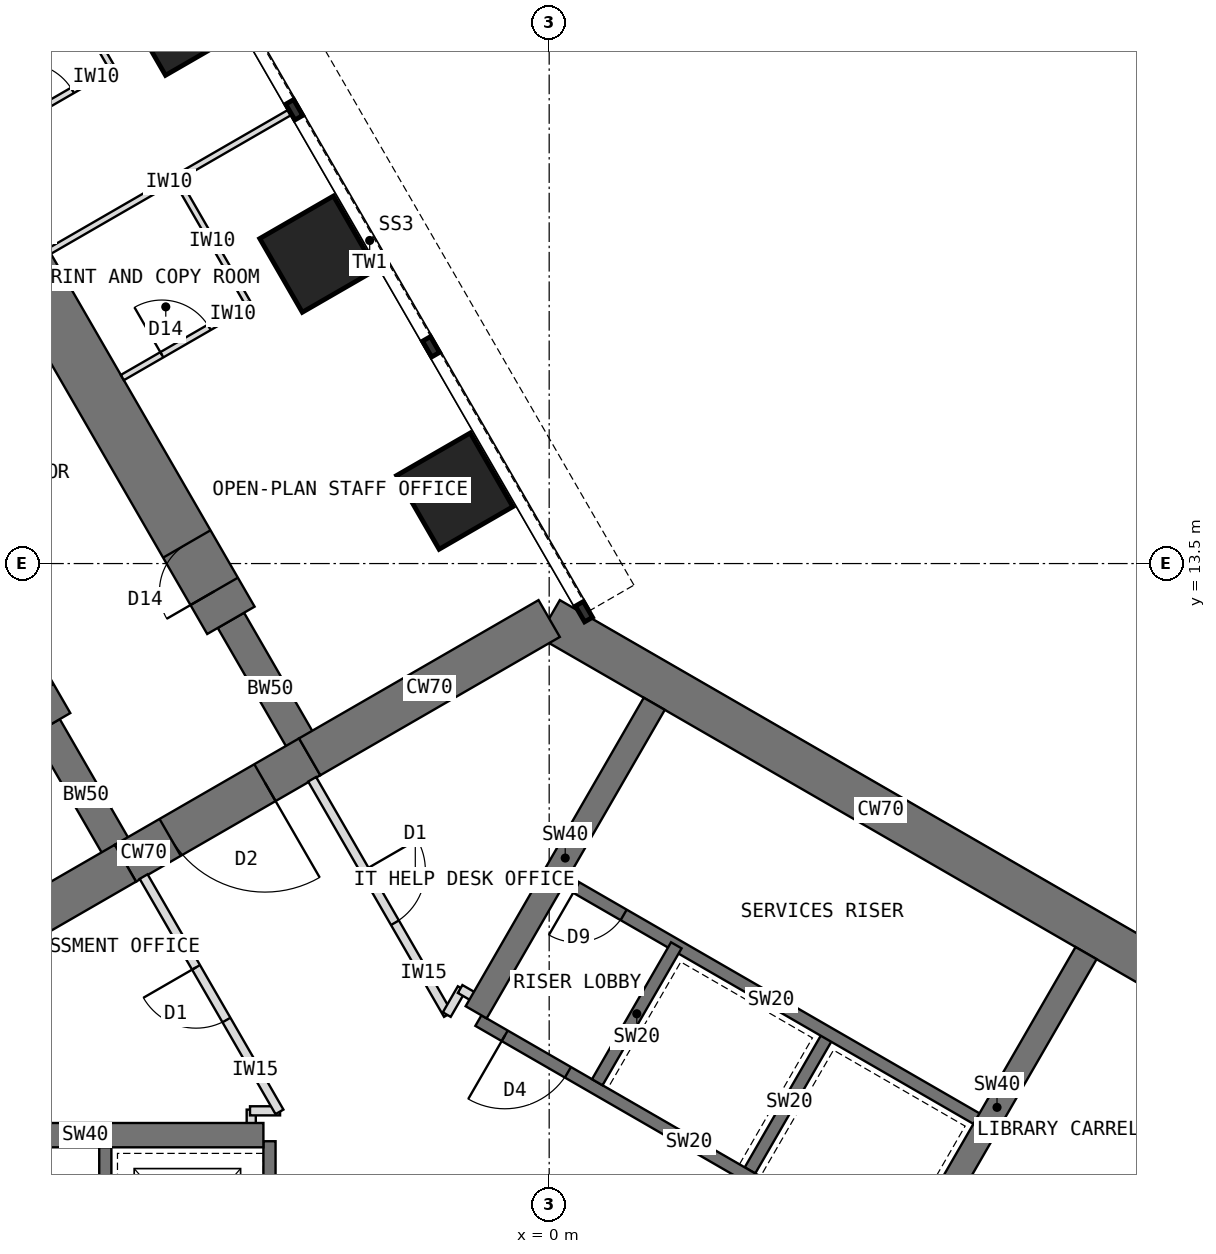
"""IFC4 building model, lengths in metres.
Left out: names, types, materials, properties, quantities, classifications, styles, units other than length and angle.
Written with IfcOpenShell. Run it as: python <this file> out.ifc"""

import sys

from ifc_helpers import new_model, si_unit, direction, frame, frame_2d, origin, origin_2d, place, context, subcontext, project, spatial, rectangle, extrude, element, fill, save


model = new_model("IFC4")
c1 = context("Model", 3, precision=1e-05, world=origin(), true_north=direction((0.0, 1.0)))
c2 = subcontext(c1, "Body", "Model", "MODEL_VIEW")
j1 = project(units=[si_unit("LENGTHUNIT", "METRE"), si_unit("PLANEANGLEUNIT", "RADIAN")], contexts=[c1])
p1 = place(None, origin())
s1 = spatial("IfcSite", under=j1, at=p1, CompositionType="ELEMENT")
p2 = place(p1, origin())
s2 = spatial("IfcBuilding", under=s1, at=p2, CompositionType="ELEMENT")
p3 = place(p2, frame((0.0, 0.0, 80.5)))
s3 = spatial("IfcBuildingStorey", under=s2, at=p3, CompositionType="ELEMENT", Elevation=80.5)
p4 = place(p3, frame((10.908, 6.298, 0.0), z_axis=(0.0, 0.0, 1.0), x_axis=(-0.866021940709, 0.500005998175, 0.0)))
e1 = element("IfcWall", 1, at=p4, inside=s3, PredefinedType="SHEAR", context=c2, shape_type="SweptSolid", body=[
    extrude(rectangle(XDim=12.596, YDim=0.7, at=frame_2d((6.298, 0.0))), origin(), (0.0, 0.0, 1.0), 4.0),
])
p5 = place(p3, frame((0.0, 12.596, 0.0), z_axis=(0.0, 0.0, 1.0), x_axis=(-0.866011268655, -0.500024481964, 0.0)))
e2 = element("IfcWall", 2, at=p5, inside=s3, PredefinedType="SHEAR", context=c2, shape_type="SweptSolid", body=[
    extrude(rectangle(XDim=4.548, YDim=0.7, at=frame_2d((2.274, 0.0))), origin(), (0.0, 0.0, 1.0), 4.0),
])
p6 = place(p3, frame((-3.939, 10.322, 0.0), z_axis=(0.0, 0.0, 1.0), x_axis=(-0.866019471182, -0.500010275428, 0.0)))
e3 = element("IfcWall", 3, at=p6, inside=s3, PredefinedType="SHEAR", context=c2, shape_type="SweptSolid", body=[
    extrude(rectangle(XDim=3.5, YDim=0.7, at=frame_2d((1.75, 0.0))), origin(), (0.0, 0.0, 1.0), 4.0),
])
p7 = place(p6, frame((0.85, 0.0, 0.0)))
e4 = element("IfcOpeningElement", 4, at=p7, cuts=e3, PredefinedType="OPENING", context=c2, shape_type="SweptSolid", body=[
    extrude(rectangle(XDim=1.8, YDim=2.1, at=frame_2d((0.9, 1.05))), frame((0.0, 0.36, 0.0), z_axis=(0.0, -1.0, 0.0), x_axis=(1.0, 0.0, 0.0)), (0.0, 0.0, 1.0), 0.72),
])
p8 = place(p3, frame((-6.97, 8.572, 0.0), z_axis=(0.0, 0.0, 1.0), x_axis=(-0.866034513004, -0.499984222037, 0.0)))
e5 = element("IfcWall", 5, at=p8, inside=s3, PredefinedType="SHEAR", context=c2, shape_type="SweptSolid", body=[
    extrude(rectangle(XDim=4.548, YDim=0.7, at=frame_2d((2.274, 0.0))), origin(), (0.0, 0.0, 1.0), 4.0),
])
p9 = place(p3, frame((-6.97, 8.572, 0.0), z_axis=(0.0, 0.0, 1.0), x_axis=(-0.499988811324, 0.866031863473, 0.0)))
e6 = element("IfcWall", 6, at=p9, inside=s3, PredefinedType="SHEAR", context=c2, shape_type="SweptSolid", body=[
    extrude(rectangle(XDim=2.592, YDim=0.5, at=frame_2d((1.296, 0.0))), origin(), (0.0, 0.0, 1.0), 4.0),
])
p10 = place(p3, frame((-8.266, 10.816, 0.0), z_axis=(0.0, 0.0, 1.0), x_axis=(-0.499996231654, 0.866027579429, 0.0)))
e7 = element("IfcWall", 7, at=p10, inside=s3, PredefinedType="SHEAR", context=c2, shape_type="SweptSolid", body=[
    extrude(rectangle(XDim=13.2, YDim=0.9, at=frame_2d((6.6, 0.0))), origin(), (0.0, 0.0, 1.0), 4.0),
])
p11 = place(p10, frame((0.55, 0.0, 0.0)))
e8 = element("IfcOpeningElement", 8, at=p11, cuts=e7, PredefinedType="OPENING", context=c2, shape_type="SweptSolid", body=[
    extrude(rectangle(XDim=0.9, YDim=2.1, at=frame_2d((0.45, 1.05))), frame((0.0, 0.46, 0.0), z_axis=(0.0, -1.0, 0.0), x_axis=(1.0, 0.0, 0.0)), (0.0, 0.0, 1.0), 0.92),
])
p12 = place(p10, frame((7.3, 0.0, 0.0)))
e9 = element("IfcOpeningElement", 9, at=p12, cuts=e7, PredefinedType="OPENING", context=c2, shape_type="SweptSolid", body=[
    extrude(rectangle(XDim=0.9, YDim=2.1, at=frame_2d((0.45, 1.05))), frame((0.0, 0.46, 0.0), z_axis=(0.0, -1.0, 0.0), x_axis=(1.0, 0.0, 0.0)), (0.0, 0.0, 1.0), 0.92),
])
p13 = place(p3, frame((-3.939, 10.322, 0.0), z_axis=(0.0, 0.0, 1.0), x_axis=(-0.499918158782, 0.866072649678, 0.0)))
e10 = element("IfcWall", 10, at=p13, inside=s3, PredefinedType="SHEAR", context=c2, shape_type="SweptSolid", body=[
    extrude(rectangle(XDim=2.592, YDim=0.5, at=frame_2d((1.296, 0.0))), origin(), (0.0, 0.0, 1.0), 4.0),
])
p14 = place(p3, frame((-5.234, 12.566, 0.0), z_axis=(0.0, 0.0, 1.0), x_axis=(-0.500010103361, 0.866019570528, 0.0)))
e11 = element("IfcWall", 11, at=p14, inside=s3, PredefinedType="SHEAR", context=c2, shape_type="SweptSolid", body=[
    extrude(rectangle(XDim=13.2, YDim=0.9, at=frame_2d((6.6, 0.0))), origin(), (0.0, 0.0, 1.0), 4.0),
])
p15 = place(p14, frame((0.55, 0.0, 0.0)))
e12 = element("IfcOpeningElement", 12, at=p15, cuts=e11, PredefinedType="OPENING", context=c2, shape_type="SweptSolid", body=[
    extrude(rectangle(XDim=0.9, YDim=2.1, at=frame_2d((0.45, 1.05))), frame((0.0, 0.46, 0.0), z_axis=(0.0, -1.0, 0.0), x_axis=(1.0, 0.0, 0.0)), (0.0, 0.0, 1.0), 0.92),
])
p16 = place(p14, frame((7.3, 0.0, 0.0)))
e13 = element("IfcOpeningElement", 13, at=p16, cuts=e11, PredefinedType="OPENING", context=c2, shape_type="SweptSolid", body=[
    extrude(rectangle(XDim=0.9, YDim=2.1, at=frame_2d((0.45, 1.05))), frame((0.0, 0.46, 0.0), z_axis=(0.0, -1.0, 0.0), x_axis=(1.0, 0.0, 0.0)), (0.0, 0.0, 1.0), 0.92),
])
for number, where, z_axis, x_axis in (
    (14, (-1.554, 14.691, 0.0), (0.0, 0.0, 1.0), (0.866, 0.5, 0.0)),
    (15, (-3.804, 18.588, 0.0), (0.0, 0.0, 1.0), (0.866, 0.5, 0.0)),
    (16, (-6.054, 22.486, 0.0), (0.0, 0.0, 1.0), (0.866, 0.5, 0.0)),
):
    element("IfcColumn", number, at=place(p3, frame(where, z_axis=z_axis, x_axis=x_axis)), inside=s3, PredefinedType="COLUMN", context=c2, shape_type="SweptSolid", body=[
        extrude(rectangle(XDim=1.4, YDim=1.4, at=origin_2d()), origin(), (0.0, 0.0, 1.0), 4.0),
    ])
p17 = place(p3, frame((5.764, 1.984, 0.0), z_axis=(0.0, 0.0, 1.0), x_axis=(-0.866026010844, 0.49999894854, 0.0)))
e17 = element("IfcWall", 17, at=p17, inside=s3, PredefinedType="SHEAR", context=c2, shape_type="SweptSolid", body=[
    extrude(rectangle(XDim=8.0, YDim=0.2, at=frame_2d((4.0, 0.0))), origin(), (0.0, 0.0, 1.0), 4.0),
])
p18 = place(p17, frame((6.3, 0.0, 0.0)))
e18 = element("IfcOpeningElement", 18, at=p18, cuts=e17, PredefinedType="OPENING", context=c2, shape_type="SweptSolid", body=[
    extrude(rectangle(XDim=1.2, YDim=2.1, at=frame_2d((0.6, 1.05))), frame((0.0, 0.11, 0.0), z_axis=(0.0, -1.0, 0.0), x_axis=(1.0, 0.0, 0.0)), (0.0, 0.0, 1.0), 0.22),
])
for number, where, z_axis, x_axis in (
    (19, (3.303, 3.52, 0.0), (0.0, 0.0, 1.0), (0.5, 0.866, 0.0)),
    (20, (0.791, 4.97, 0.0), (0.0, 0.0, 1.0), (0.5, 0.866, 0.0)),
):
    element("IfcWall", number, at=place(p3, frame(where, z_axis=z_axis, x_axis=x_axis)), inside=s3, PredefinedType="SHEAR", context=c2, shape_type="SweptSolid", body=[
        extrude(rectangle(XDim=2.6, YDim=0.2, at=frame_2d((1.3, 0.0))), origin(), (0.0, 0.0, 1.0), 4.0),
    ])
p19 = place(p3, frame((7.114, 4.322, 0.0), z_axis=(0.0, 0.0, 1.0), x_axis=(-0.866026010844, 0.49999894854, 0.0)))
e21 = element("IfcWall", 21, at=p19, inside=s3, PredefinedType="SHEAR", context=c2, shape_type="SweptSolid", body=[
    extrude(rectangle(XDim=8.0, YDim=0.2, at=frame_2d((4.0, 0.0))), origin(), (0.0, 0.0, 1.0), 4.0),
])
p20 = place(p19, frame((6.8, 0.0, 0.0)))
e22 = element("IfcOpeningElement", 22, at=p20, cuts=e21, PredefinedType="OPENING", context=c2, shape_type="SweptSolid", body=[
    extrude(rectangle(XDim=0.9, YDim=2.1, at=frame_2d((0.45, 1.05))), frame((0.0, 0.11, 0.0), z_axis=(0.0, -1.0, 0.0), x_axis=(1.0, 0.0, 0.0)), (0.0, 0.0, 1.0), 0.22),
])
for number, where, z_axis, x_axis in (
    (23, (-1.201, 6.12, 0.0), (0.0, 0.0, 1.0), (0.5, 0.866, 0.0)),
    (24, (5.901, 2.02, 0.0), (0.0, 0.0, 1.0), (0.5, 0.866, 0.0)),
):
    element("IfcWall", number, at=place(p3, frame(where, z_axis=z_axis, x_axis=x_axis)), inside=s3, PredefinedType="SHEAR", context=c2, shape_type="SweptSolid", body=[
        extrude(rectangle(XDim=5.858, YDim=0.4, at=frame_2d((2.929, 0.0))), origin(), (0.0, 0.0, 1.0), 4.0),
    ])
p21 = place(p3, frame((-4.6, 4.0, 0.0), z_axis=(0.0, 0.0, 1.0), x_axis=(0.0, -1.0, 0.0)))
e25 = element("IfcWall", 25, at=p21, inside=s3, PredefinedType="SHEAR", context=c2, shape_type="SweptSolid", body=[
    extrude(rectangle(XDim=8.0, YDim=0.2, at=frame_2d((4.0, 0.0))), origin(), (0.0, 0.0, 1.0), 4.0),
])
p22 = place(p21, frame((6.3, 0.0, 0.0)))
e26 = element("IfcOpeningElement", 26, at=p22, cuts=e25, PredefinedType="OPENING", context=c2, shape_type="SweptSolid", body=[
    extrude(rectangle(XDim=1.2, YDim=2.1, at=frame_2d((0.6, 1.05))), frame((0.0, 0.11, 0.0), z_axis=(0.0, -1.0, 0.0), x_axis=(1.0, 0.0, 0.0)), (0.0, 0.0, 1.0), 0.22),
])
p23 = place(p21, frame((0.9, 0.0, 0.0)))
e27 = element("IfcOpeningElement", 27, at=p23, cuts=e25, PredefinedType="OPENING", context=c2, shape_type="SweptSolid", body=[
    extrude(rectangle(XDim=1.1, YDim=2.2, at=frame_2d((0.55, 1.1))), frame((0.0, 0.11, 0.0), z_axis=(0.0, -1.0, 0.0), x_axis=(1.0, 0.0, 0.0)), (0.0, 0.0, 1.0), 0.22),
])
p24 = place(p3, frame((-7.3, 4.0, 0.0), z_axis=(0.0, 0.0, 1.0), x_axis=(0.0, -1.0, 0.0)))
e28 = element("IfcWall", 28, at=p24, inside=s3, PredefinedType="SHEAR", context=c2, shape_type="SweptSolid", body=[
    extrude(rectangle(XDim=8.0, YDim=0.2, at=frame_2d((4.0, 0.0))), origin(), (0.0, 0.0, 1.0), 4.0),
])
p25 = place(p24, frame((6.7, 0.0, 0.0)))
e29 = element("IfcOpeningElement", 29, at=p25, cuts=e28, PredefinedType="OPENING", context=c2, shape_type="SweptSolid", body=[
    extrude(rectangle(XDim=1.1, YDim=2.1, at=frame_2d((0.55, 1.05))), frame((0.0, 0.11, 0.0), z_axis=(0.0, -1.0, 0.0), x_axis=(1.0, 0.0, 0.0)), (0.0, 0.0, 1.0), 0.22),
])
p26 = place(p3, frame((-4.7, 4.1, 0.0), z_axis=(0.0, 0.0, 1.0), x_axis=(-1.0, 0.0, 0.0)))
e30 = element("IfcWall", 30, at=p26, inside=s3, PredefinedType="SHEAR", context=c2, shape_type="SweptSolid", body=[
    extrude(rectangle(XDim=5.858, YDim=0.4, at=frame_2d((2.929, 0.0))), origin(), (0.0, 0.0, 1.0), 4.0),
])
p27 = place(p3, frame((-8.22, 18.637, 0.0), z_axis=(0.0, 0.0, 1.0), x_axis=(0.866012237902, 0.500022803284, 0.0)))
e31 = element("IfcWall", 31, at=p27, inside=s3, PredefinedType="PARTITIONING", context=c2, shape_type="SweptSolid", body=[
    extrude(rectangle(XDim=4.55, YDim=0.1, at=frame_2d((2.275, 0.0))), origin(), (0.0, 0.0, 1.0), 3.8),
])
p28 = place(p3, frame((-4.941, 17.759, 0.0), z_axis=(0.0, 0.0, 1.0), x_axis=(-0.500077600433, 0.865980596518, 0.0)))
e32 = element("IfcWall", 32, at=p28, inside=s3, PredefinedType="PARTITIONING", context=c2, shape_type="SweptSolid", body=[
    extrude(rectangle(XDim=2.4, YDim=0.1, at=frame_2d((1.2, 0.0))), origin(), (0.0, 0.0, 1.0), 3.8),
])
p29 = place(p3, frame((-7.02, 16.559, 0.0), z_axis=(0.0, 0.0, 1.0), x_axis=(0.866050077142, 0.499957262057, 0.0)))
e33 = element("IfcWall", 33, at=p29, inside=s3, PredefinedType="PARTITIONING", context=c2, shape_type="SweptSolid", body=[
    extrude(rectangle(XDim=2.4, YDim=0.1, at=frame_2d((1.2, 0.0))), origin(), (0.0, 0.0, 1.0), 3.8),
])
p30 = place(p29, frame((0.75, 0.0, 0.0)))
e34 = element("IfcOpeningElement", 34, at=p30, cuts=e33, PredefinedType="OPENING", context=c2, shape_type="SweptSolid", body=[
    extrude(rectangle(XDim=0.9, YDim=2.1, at=frame_2d((0.45, 1.05))), frame((0.0, 0.06, 0.0), z_axis=(0.0, -1.0, 0.0), x_axis=(1.0, 0.0, 0.0)), (0.0, 0.0, 1.0), 0.12),
])
p31 = place(p3, frame((-7.191, 21.656, 0.0), z_axis=(0.0, 0.0, 1.0), x_axis=(-0.500077600433, 0.865980596518, 0.0)))
e35 = element("IfcWall", 35, at=p31, inside=s3, PredefinedType="PARTITIONING", context=c2, shape_type="SweptSolid", body=[
    extrude(rectangle(XDim=2.4, YDim=0.1, at=frame_2d((1.2, 0.0))), origin(), (0.0, 0.0, 1.0), 3.8),
])
p32 = place(p3, frame((-9.27, 20.456, 0.0), z_axis=(0.0, 0.0, 1.0), x_axis=(0.866006032174, 0.500033551112, 0.0)))
e36 = element("IfcWall", 36, at=p32, inside=s3, PredefinedType="PARTITIONING", context=c2, shape_type="SweptSolid", body=[
    extrude(rectangle(XDim=2.4, YDim=0.1, at=frame_2d((1.2, 0.0))), origin(), (0.0, 0.0, 1.0), 3.8),
])
p33 = place(p32, frame((0.75, 0.0, 0.0)))
e37 = element("IfcOpeningElement", 37, at=p33, cuts=e36, PredefinedType="OPENING", context=c2, shape_type="SweptSolid", body=[
    extrude(rectangle(XDim=0.9, YDim=2.1, at=frame_2d((0.45, 1.05))), frame((0.0, 0.06, 0.0), z_axis=(0.0, -1.0, 0.0), x_axis=(1.0, 0.0, 0.0)), (0.0, 0.0, 1.0), 0.12),
])
p34 = place(p3, frame((-4.9, 4.09, 0.0), z_axis=(0.0, 0.0, 1.0), x_axis=(0.0, 1.0, 0.0)))
e38 = element("IfcWall", 38, at=p34, inside=s3, PredefinedType="PARTITIONING", context=c2, shape_type="SweptSolid", body=[
    extrude(rectangle(XDim=0.43, YDim=0.15, at=frame_2d((0.215, 0.0))), origin(), (0.0, 0.0, 1.0), 3.8),
])
p35 = place(p3, frame((-4.92, 4.5, 0.0), z_axis=(0.0, 0.0, 1.0), x_axis=(1.0, 0.0, 0.0)))
e39 = element("IfcWall", 39, at=p35, inside=s3, PredefinedType="PARTITIONING", context=c2, shape_type="SweptSolid", body=[
    extrude(rectangle(XDim=0.494, YDim=0.15, at=frame_2d((0.247, 0.0))), origin(), (0.0, 0.0, 1.0), 3.8),
])
p36 = place(p3, frame((-4.436, 4.483, 0.0), z_axis=(0.0, 0.0, 1.0), x_axis=(-0.500017246033, 0.866015446554, 0.0)))
e40 = element("IfcWall", 40, at=p36, inside=s3, PredefinedType="PARTITIONING", context=c2, shape_type="SweptSolid", body=[
    extrude(rectangle(XDim=4.469, YDim=0.15, at=frame_2d((2.234, 0.0))), origin(), (0.0, 0.0, 1.0), 3.8),
])
p37 = place(p36, frame((1.744, 0.0, 0.0)))
e41 = element("IfcOpeningElement", 41, at=p37, cuts=e40, PredefinedType="OPENING", context=c2, shape_type="SweptSolid", body=[
    extrude(rectangle(XDim=1.0, YDim=2.1, at=frame_2d((0.5, 1.05))), frame((0.0, 0.085, 0.0), z_axis=(0.0, -1.0, 0.0), x_axis=(1.0, 0.0, 0.0)), (0.0, 0.0, 1.0), 0.17),
])
p38 = place(p3, frame((-3.898, 9.952, 0.0), z_axis=(0.0, 0.0, 1.0), x_axis=(0.499999927604, -0.866025445582, 0.0)))
e42 = element("IfcWall", 42, at=p38, inside=s3, PredefinedType="PARTITIONING", context=c2, shape_type="SweptSolid", body=[
    extrude(rectangle(XDim=4.468, YDim=0.15, at=frame_2d((2.234, 0.0))), origin(), (0.0, 0.0, 1.0), 3.8),
])
p39 = place(p38, frame((1.724, 0.0, 0.0)))
e43 = element("IfcOpeningElement", 43, at=p39, cuts=e42, PredefinedType="OPENING", context=c2, shape_type="SweptSolid", body=[
    extrude(rectangle(XDim=1.0, YDim=2.1, at=frame_2d((0.5, 1.05))), frame((0.0, 0.085, 0.0), z_axis=(0.0, -1.0, 0.0), x_axis=(1.0, 0.0, 0.0)), (0.0, 0.0, 1.0), 0.17),
])
p40 = place(p3, frame((-1.684, 6.083, 0.0), z_axis=(0.0, 0.0, 1.0), x_axis=(0.50033519877, 0.865831790172, 0.0)))
e44 = element("IfcWall", 44, at=p40, inside=s3, PredefinedType="PARTITIONING", context=c2, shape_type="SweptSolid", body=[
    extrude(rectangle(XDim=0.494, YDim=0.15, at=frame_2d((0.247, 0.0))), origin(), (0.0, 0.0, 1.0), 3.8),
])
p41 = place(p3, frame((-1.464, 6.503, 0.0), z_axis=(0.0, 0.0, 1.0), x_axis=(0.866138304741, -0.499804398801, 0.0)))
e45 = element("IfcWall", 45, at=p41, inside=s3, PredefinedType="PARTITIONING", context=c2, shape_type="SweptSolid", body=[
    extrude(rectangle(XDim=0.43, YDim=0.15, at=frame_2d((0.215, 0.0))), origin(), (0.0, 0.0, 1.0), 3.8),
])
p42 = place(p18, origin())
e46 = element("IfcDoor", 46, at=p42, inside=s3, OperationType="SINGLE_SWING_RIGHT", PredefinedType="DOOR", context=c2, shape_type="SweptSolid", body=[
    extrude(rectangle(XDim=1.2, YDim=2.1, at=frame_2d((0.6, 1.05))), frame((0.0, 0.025, 0.0), z_axis=(0.0, -1.0, 0.0), x_axis=(1.0, 0.0, 0.0)), (0.0, 0.0, 1.0), 0.05),
])
fill(e18, e46)
p43 = place(p20, origin())
e47 = element("IfcDoor", 47, at=p43, inside=s3, OperationType="SINGLE_SWING_RIGHT", PredefinedType="DOOR", context=c2, shape_type="SweptSolid", body=[
    extrude(rectangle(XDim=0.9, YDim=2.1, at=frame_2d((0.45, 1.05))), frame((0.0, 0.025, 0.0), z_axis=(0.0, -1.0, 0.0), x_axis=(1.0, 0.0, 0.0)), (0.0, 0.0, 1.0), 0.05),
])
fill(e22, e47)
p44 = place(p7, origin())
e48 = element("IfcDoor", 48, at=p44, inside=s3, OperationType="DOUBLE_DOOR_DOUBLE_SWING", PredefinedType="DOOR", context=c2, shape_type="SweptSolid", body=[
    extrude(rectangle(XDim=1.72, YDim=2.06, at=frame_2d((0.9, 1.03))), frame((0.0, 0.025, 0.0), z_axis=(0.0, -1.0, 0.0), x_axis=(1.0, 0.0, 0.0)), (0.0, 0.0, 1.0), 0.05),
    extrude(rectangle(XDim=0.04, YDim=2.1, at=frame_2d((0.02, 1.05))), frame((0.0, 0.35, 0.0), z_axis=(0.0, -1.0, 0.0), x_axis=(1.0, 0.0, 0.0)), (0.0, 0.0, 1.0), 0.699),
    extrude(rectangle(XDim=0.04, YDim=2.1, at=frame_2d((1.78, 1.05))), frame((0.0, 0.35, 0.0), z_axis=(0.0, -1.0, 0.0), x_axis=(1.0, 0.0, 0.0)), (0.0, 0.0, 1.0), 0.699),
    extrude(rectangle(XDim=1.72, YDim=0.04, at=frame_2d((0.9, 2.08))), frame((0.0, 0.35, 0.0), z_axis=(0.0, -1.0, 0.0), x_axis=(1.0, 0.0, 0.0)), (0.0, 0.0, 1.0), 0.699),
])
fill(e4, e48)
p45 = place(p30, origin())
e49 = element("IfcDoor", 49, at=p45, inside=s3, OperationType="SINGLE_SWING_LEFT", PredefinedType="DOOR", context=c2, shape_type="SweptSolid", body=[
    extrude(rectangle(XDim=0.9, YDim=2.1, at=frame_2d((0.45, 1.05))), frame((0.0, 0.025, 0.0), z_axis=(0.0, -1.0, 0.0), x_axis=(1.0, 0.0, 0.0)), (0.0, 0.0, 1.0), 0.05),
])
fill(e34, e49)
p46 = place(p33, origin())
e50 = element("IfcDoor", 50, at=p46, inside=s3, OperationType="SINGLE_SWING_LEFT", PredefinedType="DOOR", context=c2, shape_type="SweptSolid", body=[
    extrude(rectangle(XDim=0.9, YDim=2.1, at=frame_2d((0.45, 1.05))), frame((0.0, 0.025, 0.0), z_axis=(0.0, -1.0, 0.0), x_axis=(1.0, 0.0, 0.0)), (0.0, 0.0, 1.0), 0.05),
])
fill(e37, e50)
p47 = place(p39, origin())
e51 = element("IfcDoor", 51, at=p47, inside=s3, OperationType="SINGLE_SWING_LEFT", PredefinedType="DOOR", context=c2, shape_type="SweptSolid", body=[
    extrude(rectangle(XDim=1.0, YDim=2.1, at=frame_2d((0.5, 1.05))), frame((0.0, 0.025, 0.0), z_axis=(0.0, -1.0, 0.0), x_axis=(1.0, 0.0, 0.0)), (0.0, 0.0, 1.0), 0.05),
])
fill(e43, e51)
p48 = place(p37, origin())
e52 = element("IfcDoor", 52, at=p48, inside=s3, OperationType="SINGLE_SWING_RIGHT", PredefinedType="DOOR", context=c2, shape_type="SweptSolid", body=[
    extrude(rectangle(XDim=1.0, YDim=2.1, at=frame_2d((0.5, 1.05))), frame((0.0, 0.025, 0.0), z_axis=(0.0, -1.0, 0.0), x_axis=(1.0, 0.0, 0.0)), (0.0, 0.0, 1.0), 0.05),
])
fill(e41, e52)
p49 = place(p11, origin())
e53 = element("IfcDoor", 53, at=p49, inside=s3, OperationType="SINGLE_SWING_LEFT", PredefinedType="DOOR", context=c2, shape_type="SweptSolid", body=[
    extrude(rectangle(XDim=0.82, YDim=2.06, at=frame_2d((0.45, 1.03))), frame((0.0, 0.025, 0.0), z_axis=(0.0, -1.0, 0.0), x_axis=(1.0, 0.0, 0.0)), (0.0, 0.0, 1.0), 0.05),
    extrude(rectangle(XDim=0.04, YDim=2.1, at=frame_2d((0.02, 1.05))), frame((0.0, 0.45, 0.0), z_axis=(0.0, -1.0, 0.0), x_axis=(1.0, 0.0, 0.0)), (0.0, 0.0, 1.0), 0.899),
    extrude(rectangle(XDim=0.04, YDim=2.1, at=frame_2d((0.88, 1.05))), frame((0.0, 0.45, 0.0), z_axis=(0.0, -1.0, 0.0), x_axis=(1.0, 0.0, 0.0)), (0.0, 0.0, 1.0), 0.899),
    extrude(rectangle(XDim=0.82, YDim=0.04, at=frame_2d((0.45, 2.08))), frame((0.0, 0.45, 0.0), z_axis=(0.0, -1.0, 0.0), x_axis=(1.0, 0.0, 0.0)), (0.0, 0.0, 1.0), 0.899),
])
fill(e8, e53)
p50 = place(p15, origin())
e54 = element("IfcDoor", 54, at=p50, inside=s3, OperationType="SINGLE_SWING_LEFT", PredefinedType="DOOR", context=c2, shape_type="SweptSolid", body=[
    extrude(rectangle(XDim=0.82, YDim=2.06, at=frame_2d((0.45, 1.03))), frame((0.0, 0.025, 0.0), z_axis=(0.0, -1.0, 0.0), x_axis=(1.0, 0.0, 0.0)), (0.0, 0.0, 1.0), 0.05),
    extrude(rectangle(XDim=0.04, YDim=2.1, at=frame_2d((0.02, 1.05))), frame((0.0, 0.45, 0.0), z_axis=(0.0, -1.0, 0.0), x_axis=(1.0, 0.0, 0.0)), (0.0, 0.0, 1.0), 0.899),
    extrude(rectangle(XDim=0.04, YDim=2.1, at=frame_2d((0.88, 1.05))), frame((0.0, 0.45, 0.0), z_axis=(0.0, -1.0, 0.0), x_axis=(1.0, 0.0, 0.0)), (0.0, 0.0, 1.0), 0.899),
    extrude(rectangle(XDim=0.82, YDim=0.04, at=frame_2d((0.45, 2.08))), frame((0.0, 0.45, 0.0), z_axis=(0.0, -1.0, 0.0), x_axis=(1.0, 0.0, 0.0)), (0.0, 0.0, 1.0), 0.899),
])
fill(e12, e54)
save(model, sys.argv[1])
